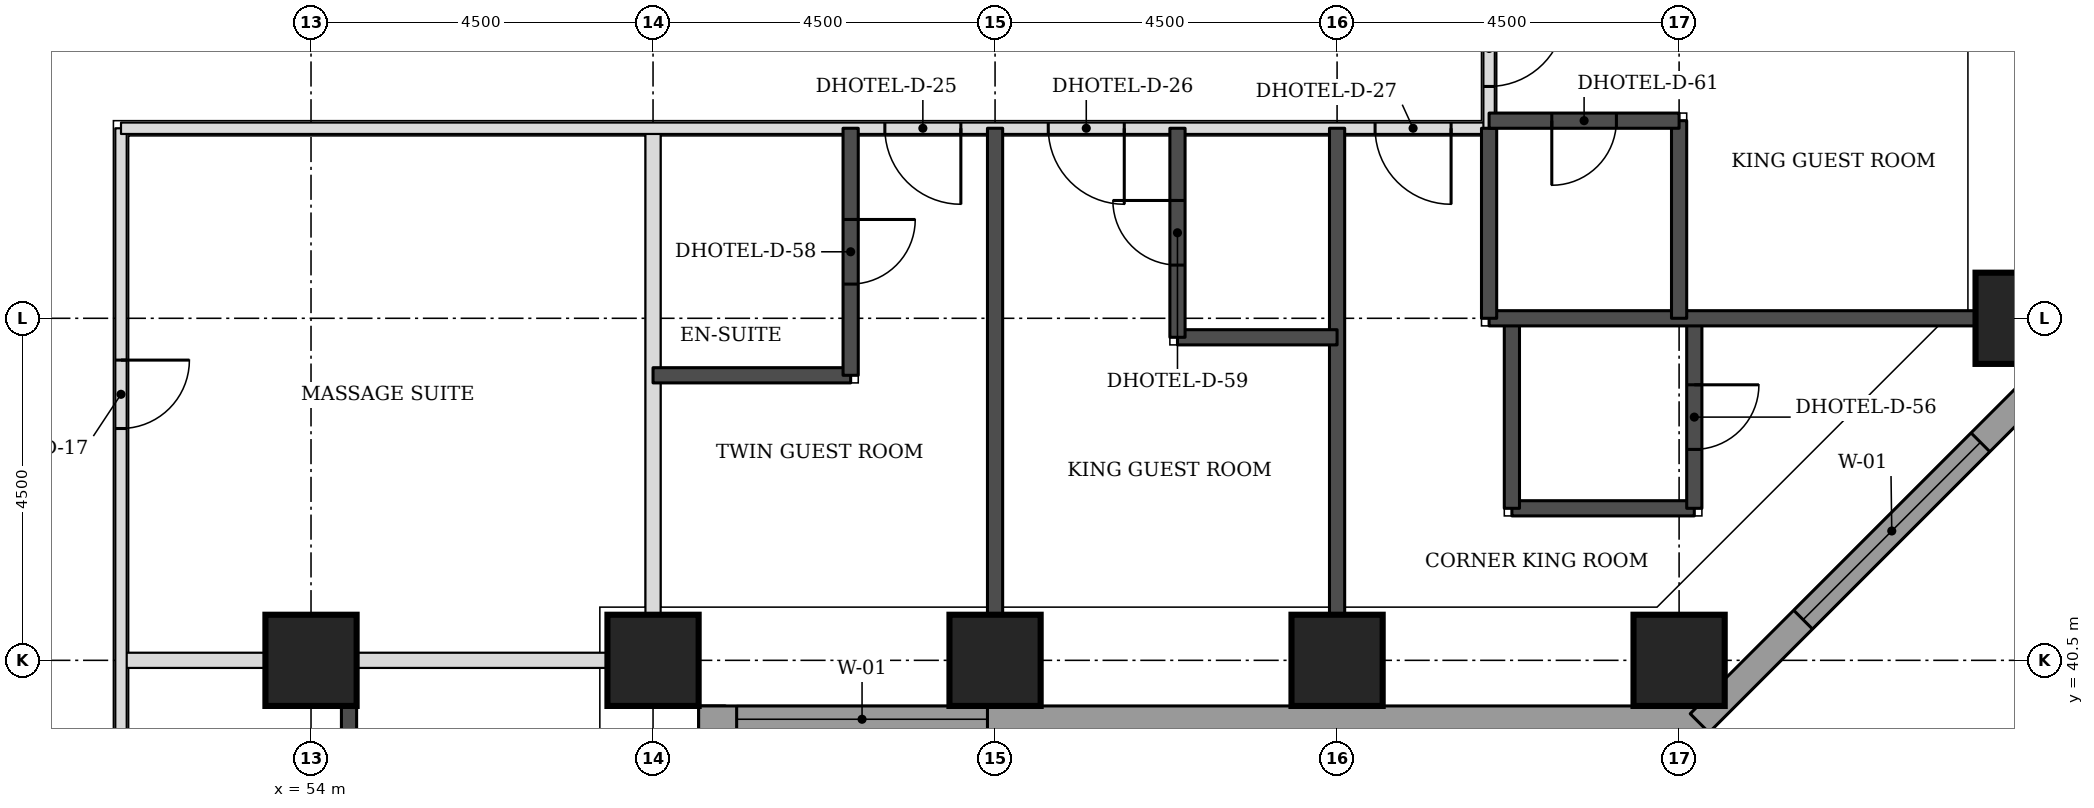
"""IFC4 building model, lengths in metres.
Left out: names, types, materials, properties, quantities, classifications, styles, units other than length and angle.
Written with IfcOpenShell. Run it as: python <this file> out.ifc"""

import sys

from ifc_helpers import new_model, si_unit, direction, frame, frame_2d, origin, origin_2d, place, context, subcontext, project, spatial, rectangle, extrude, element, fill, save


model = new_model("IFC4")
c1 = context("Model", 3, precision=1e-05, world=origin(), true_north=direction((0.0, 1.0)))
c2 = subcontext(c1, "Body", "Model", "MODEL_VIEW")
j1 = project(units=[si_unit("LENGTHUNIT", "METRE"), si_unit("PLANEANGLEUNIT", "RADIAN")], contexts=[c1])
p1 = place(None, origin())
s1 = spatial("IfcSite", under=j1, at=p1, CompositionType="ELEMENT")
p2 = place(p1, origin())
s2 = spatial("IfcBuilding", under=s1, at=p2, CompositionType="ELEMENT")
p3 = place(p2, frame((0.0, 0.0, 36.3)))
s3 = spatial("IfcBuildingStorey", under=s2, at=p3, CompositionType="ELEMENT", Elevation=36.3)
for number, where, z_axis, x_axis in (
    (1, (54.0, 40.5, 0.0), (0.0, 0.0, 1.0), (1.0, 0.0, 0.0)),
    (2, (58.5, 40.5, 0.0), (0.0, 0.0, 1.0), (1.0, 0.0, 0.0)),
    (3, (63.0, 40.5, 0.0), (0.0, 0.0, 1.0), (1.0, 0.0, 0.0)),
    (4, (67.5, 40.5, 0.0), (0.0, 0.0, 1.0), (1.0, 0.0, 0.0)),
    (5, (72.0, 40.5, 0.0), (0.0, 0.0, 1.0), (1.0, 0.0, 0.0)),
    (6, (76.5, 45.0, 0.0), (0.0, 0.0, 1.0), (1.0, 0.0, 0.0)),
):
    element("IfcColumn", number, at=place(p3, frame(where, z_axis=z_axis, x_axis=x_axis)), inside=s3, PredefinedType="COLUMN", context=c2, shape_type="SweptSolid", body=[
        extrude(rectangle(XDim=1.2, YDim=1.2, at=origin_2d()), origin(), (0.0, 0.0, 1.0), 3.3),
    ])
p4 = place(p3, frame((59.275, 22.106, 0.0), z_axis=(0.0, 0.0, 1.0), x_axis=(0.0, 1.0, 0.0)))
e7 = element("IfcWall", 7, at=p4, inside=s3, PredefinedType="STANDARD", context=c2, shape_type="SweptSolid", body=[
    extrude(rectangle(XDim=17.793, YDim=0.35, at=frame_2d((8.897, 0.0))), origin(), (0.0, 0.0, 1.0), 3.055),
])
p5 = place(p4, frame((5.493, 0.0, 0.8)))
e8 = element("IfcOpeningElement", 8, at=p5, cuts=e7, PredefinedType="OPENING", context=c2, shape_type="SweptSolid", body=[
    extrude(rectangle(XDim=3.3, YDim=1.5, at=frame_2d((1.65, 0.75))), frame((0.0, 0.185, 0.0), z_axis=(0.0, -1.0, 0.0), x_axis=(1.0, 0.0, 0.0)), (0.0, 0.0, 1.0), 0.37),
])
p6 = place(p4, frame((13.993, 0.0, 0.8)))
e9 = element("IfcOpeningElement", 9, at=p6, cuts=e7, PredefinedType="OPENING", context=c2, shape_type="SweptSolid", body=[
    extrude(rectangle(XDim=3.3, YDim=1.5, at=frame_2d((1.65, 0.75))), frame((0.0, 0.185, 0.0), z_axis=(0.0, -1.0, 0.0), x_axis=(1.0, 0.0, 0.0)), (0.0, 0.0, 1.0), 0.37),
])
p7 = place(p3, frame((59.1, 39.725, 0.0), z_axis=(0.0, 0.0, 1.0), x_axis=(1.0, 0.0, 0.0)))
e10 = element("IfcWall", 10, at=p7, inside=s3, PredefinedType="STANDARD", context=c2, shape_type="SweptSolid", body=[
    extrude(rectangle(XDim=13.293, YDim=0.35, at=frame_2d((6.647, 0.0))), origin(), (0.0, 0.0, 1.0), 3.055),
])
p8 = place(p7, frame((0.5, 0.0, 0.8)))
e11 = element("IfcOpeningElement", 11, at=p8, cuts=e10, PredefinedType="OPENING", context=c2, shape_type="SweptSolid", body=[
    extrude(rectangle(XDim=3.3, YDim=1.5, at=frame_2d((1.65, 0.75))), frame((0.0, 0.185, 0.0), z_axis=(0.0, -1.0, 0.0), x_axis=(1.0, 0.0, 0.0)), (0.0, 0.0, 1.0), 0.37),
])
p9 = place(p3, frame((72.27, 39.674, 0.0), z_axis=(0.0, 0.0, 1.0), x_axis=(0.707106781187, 0.707106781187, 0.0)))
e12 = element("IfcWall", 12, at=p9, inside=s3, PredefinedType="STANDARD", context=c2, shape_type="SweptSolid", body=[
    extrude(rectangle(XDim=7.151, YDim=0.35, at=frame_2d((3.576, 0.0))), origin(), (0.0, 0.0, 1.0), 3.055),
])
p10 = place(p9, frame((1.926, 0.0, 0.8)))
e13 = element("IfcOpeningElement", 13, at=p10, cuts=e12, PredefinedType="OPENING", context=c2, shape_type="SweptSolid", body=[
    extrude(rectangle(XDim=3.3, YDim=1.5, at=frame_2d((1.65, 0.75))), frame((0.0, 0.185, 0.0), z_axis=(0.0, -1.0, 0.0), x_axis=(1.0, 0.0, 0.0)), (0.0, 0.0, 1.0), 0.37),
])
p11 = place(p3, frame((51.5, 40.5, 0.0), z_axis=(0.0, 0.0, 1.0), x_axis=(1.0, 0.0, 0.0)))
e14 = element("IfcWall", 14, at=p11, inside=s3, PredefinedType="PARTITIONING", context=c2, shape_type="SweptSolid", body=[
    extrude(rectangle(XDim=6.4, YDim=0.2, at=frame_2d((3.2, 0.0))), origin(), (0.0, 0.0, 1.0), 2.33),
])
p12 = place(p3, frame((58.5, 41.1, 0.0), z_axis=(0.0, 0.0, 1.0), x_axis=(0.0, 1.0, 0.0)))
e15 = element("IfcWall", 15, at=p12, inside=s3, PredefinedType="PARTITIONING", context=c2, shape_type="SweptSolid", body=[
    extrude(rectangle(XDim=6.4, YDim=0.2, at=frame_2d((3.2, 0.0))), origin(), (0.0, 0.0, 1.0), 3.08),
])
p13 = place(p3, frame((51.5, 25.15, 0.0), z_axis=(0.0, 0.0, 1.0), x_axis=(0.0, 1.0, 0.0)))
e16 = element("IfcWall", 16, at=p13, inside=s3, PredefinedType="PARTITIONING", context=c2, shape_type="SweptSolid", body=[
    extrude(rectangle(XDim=22.35, YDim=0.15, at=frame_2d((11.175, 0.0))), origin(), (0.0, 0.0, 1.0), 3.08),
])
p14 = place(p13, frame((0.347, 0.0, 0.0)))
e17 = element("IfcOpeningElement", 17, at=p14, cuts=e16, PredefinedType="OPENING", context=c2, shape_type="SweptSolid", body=[
    extrude(rectangle(XDim=1.0, YDim=2.1, at=frame_2d((0.5, 1.05))), frame((0.0, 0.085, 0.0), z_axis=(0.0, -1.0, 0.0), x_axis=(1.0, 0.0, 0.0)), (0.0, 0.0, 1.0), 0.17),
])
p15 = place(p13, frame((2.3, 0.0, 0.0)))
e18 = element("IfcOpeningElement", 18, at=p15, cuts=e16, PredefinedType="OPENING", context=c2, shape_type="SweptSolid", body=[
    extrude(rectangle(XDim=1.0, YDim=2.1, at=frame_2d((0.5, 1.05))), frame((0.0, 0.085, 0.0), z_axis=(0.0, -1.0, 0.0), x_axis=(1.0, 0.0, 0.0)), (0.0, 0.0, 1.0), 0.17),
])
p16 = place(p13, frame((9.15, 0.0, 0.0)))
e19 = element("IfcOpeningElement", 19, at=p16, cuts=e16, PredefinedType="OPENING", context=c2, shape_type="SweptSolid", body=[
    extrude(rectangle(XDim=1.0, YDim=2.1, at=frame_2d((0.5, 1.05))), frame((0.0, 0.085, 0.0), z_axis=(0.0, -1.0, 0.0), x_axis=(1.0, 0.0, 0.0)), (0.0, 0.0, 1.0), 0.17),
])
p17 = place(p13, frame((11.3, 0.0, 0.0)))
e20 = element("IfcOpeningElement", 20, at=p17, cuts=e16, PredefinedType="OPENING", context=c2, shape_type="SweptSolid", body=[
    extrude(rectangle(XDim=1.0, YDim=2.1, at=frame_2d((0.5, 1.05))), frame((0.0, 0.085, 0.0), z_axis=(0.0, -1.0, 0.0), x_axis=(1.0, 0.0, 0.0)), (0.0, 0.0, 1.0), 0.17),
])
p18 = place(p13, frame((18.4, 0.0, 0.0)))
e21 = element("IfcOpeningElement", 21, at=p18, cuts=e16, PredefinedType="OPENING", context=c2, shape_type="SweptSolid", body=[
    extrude(rectangle(XDim=0.9, YDim=2.1, at=frame_2d((0.45, 1.05))), frame((0.0, 0.085, 0.0), z_axis=(0.0, -1.0, 0.0), x_axis=(1.0, 0.0, 0.0)), (0.0, 0.0, 1.0), 0.17),
])
p19 = place(p3, frame((51.5, 47.5, 0.0), z_axis=(0.0, 0.0, 1.0), x_axis=(1.0, 0.0, 0.0)))
e22 = element("IfcWall", 22, at=p19, inside=s3, PredefinedType="PARTITIONING", context=c2, shape_type="SweptSolid", body=[
    extrude(rectangle(XDim=18.0, YDim=0.15, at=frame_2d((9.0, 0.0))), origin(), (0.0, 0.0, 1.0), 3.08),
])
p20 = place(p19, frame((12.2, 0.0, 0.0)))
e23 = element("IfcOpeningElement", 23, at=p20, cuts=e22, PredefinedType="OPENING", context=c2, shape_type="SweptSolid", body=[
    extrude(rectangle(XDim=1.0, YDim=2.1, at=frame_2d((0.5, 1.05))), frame((0.0, 0.085, 0.0), z_axis=(0.0, -1.0, 0.0), x_axis=(1.0, 0.0, 0.0)), (0.0, 0.0, 1.0), 0.17),
])
p21 = place(p19, frame((10.05, 0.0, 0.0)))
e24 = element("IfcOpeningElement", 24, at=p21, cuts=e22, PredefinedType="OPENING", context=c2, shape_type="SweptSolid", body=[
    extrude(rectangle(XDim=1.0, YDim=2.1, at=frame_2d((0.5, 1.05))), frame((0.0, 0.085, 0.0), z_axis=(0.0, -1.0, 0.0), x_axis=(1.0, 0.0, 0.0)), (0.0, 0.0, 1.0), 0.17),
])
p22 = place(p19, frame((16.5, 0.0, 0.0)))
e25 = element("IfcOpeningElement", 25, at=p22, cuts=e22, PredefinedType="OPENING", context=c2, shape_type="SweptSolid", body=[
    extrude(rectangle(XDim=1.0, YDim=2.1, at=frame_2d((0.5, 1.05))), frame((0.0, 0.085, 0.0), z_axis=(0.0, -1.0, 0.0), x_axis=(1.0, 0.0, 0.0)), (0.0, 0.0, 1.0), 0.17),
])
p23 = place(p3, frame((69.5, 47.5, 0.0), z_axis=(0.0, 0.0, 1.0), x_axis=(0.0, 1.0, 0.0)))
e26 = element("IfcWall", 26, at=p23, inside=s3, PredefinedType="PARTITIONING", context=c2, shape_type="SweptSolid", body=[
    extrude(rectangle(XDim=26.5, YDim=0.15, at=frame_2d((13.25, 0.0))), origin(), (0.0, 0.0, 1.0), 3.08),
])
p24 = place(p23, frame((22.65, 0.0, 0.0)))
e27 = element("IfcOpeningElement", 27, at=p24, cuts=e26, PredefinedType="OPENING", context=c2, shape_type="SweptSolid", body=[
    extrude(rectangle(XDim=1.0, YDim=2.1, at=frame_2d((0.5, 1.05))), frame((0.0, 0.085, 0.0), z_axis=(0.0, -1.0, 0.0), x_axis=(1.0, 0.0, 0.0)), (0.0, 0.0, 1.0), 0.17),
])
p25 = place(p23, frame((16.6, 0.0, 0.0)))
e28 = element("IfcOpeningElement", 28, at=p25, cuts=e26, PredefinedType="OPENING", context=c2, shape_type="SweptSolid", body=[
    extrude(rectangle(XDim=1.0, YDim=2.1, at=frame_2d((0.5, 1.05))), frame((0.0, 0.085, 0.0), z_axis=(0.0, -1.0, 0.0), x_axis=(1.0, 0.0, 0.0)), (0.0, 0.0, 1.0), 0.17),
])
p26 = place(p23, frame((4.25, 0.0, 0.0)))
e29 = element("IfcOpeningElement", 29, at=p26, cuts=e26, PredefinedType="OPENING", context=c2, shape_type="SweptSolid", body=[
    extrude(rectangle(XDim=1.1, YDim=2.1, at=frame_2d((0.55, 1.05))), frame((0.0, 0.085, 0.0), z_axis=(0.0, -1.0, 0.0), x_axis=(1.0, 0.0, 0.0)), (0.0, 0.0, 1.0), 0.17),
])
p27 = place(p23, frame((0.55, 0.0, 0.0)))
e30 = element("IfcOpeningElement", 30, at=p27, cuts=e26, PredefinedType="OPENING", context=c2, shape_type="SweptSolid", body=[
    extrude(rectangle(XDim=1.0, YDim=2.1, at=frame_2d((0.5, 1.05))), frame((0.0, 0.085, 0.0), z_axis=(0.0, -1.0, 0.0), x_axis=(1.0, 0.0, 0.0)), (0.0, 0.0, 1.0), 0.17),
])
p28 = place(p3, frame((54.5, 37.9, 0.0), z_axis=(0.0, 0.0, 1.0), x_axis=(0.0, 1.0, 0.0)))
e31 = element("IfcWall", 31, at=p28, inside=s3, PredefinedType="SOLIDWALL", context=c2, shape_type="SweptSolid", body=[
    extrude(rectangle(XDim=2.6, YDim=0.2, at=frame_2d((1.3, 0.0))), origin(), (0.0, 0.0, 1.0), 3.08),
])
for number, where, z_axis, x_axis in (
    (32, (63.0, 41.1, 0.0), (0.0, 0.0, 1.0), (0.0, 1.0, 0.0)),
    (33, (67.5, 41.1, 0.0), (0.0, 0.0, 1.0), (0.0, 1.0, 0.0)),
):
    element("IfcWall", number, at=place(p3, frame(where, z_axis=z_axis, x_axis=x_axis)), inside=s3, PredefinedType="SOLIDWALL", context=c2, shape_type="SweptSolid", body=[
        extrude(rectangle(XDim=6.4, YDim=0.2, at=frame_2d((3.2, 0.0))), origin(), (0.0, 0.0, 1.0), 3.08),
    ])
p29 = place(p3, frame((69.8, 42.5, 0.0), z_axis=(0.0, 0.0, 1.0), x_axis=(1.0, 0.0, 0.0)))
e34 = element("IfcWall", 34, at=p29, inside=s3, PredefinedType="SOLIDWALL", context=c2, shape_type="SweptSolid", body=[
    extrude(rectangle(XDim=2.4, YDim=0.2, at=frame_2d((1.2, 0.0))), origin(), (0.0, 0.0, 1.0), 3.08),
])
p30 = place(p3, frame((69.8, 42.5, 0.0), z_axis=(0.0, 0.0, 1.0), x_axis=(0.0, 1.0, 0.0)))
e35 = element("IfcWall", 35, at=p30, inside=s3, PredefinedType="SOLIDWALL", context=c2, shape_type="SweptSolid", body=[
    extrude(rectangle(XDim=2.5, YDim=0.2, at=frame_2d((1.25, 0.0))), origin(), (0.0, 0.0, 1.0), 3.08),
])
p31 = place(p3, frame((72.2, 42.5, 0.0), z_axis=(0.0, 0.0, 1.0), x_axis=(0.0, 1.0, 0.0)))
e36 = element("IfcWall", 36, at=p31, inside=s3, PredefinedType="SOLIDWALL", context=c2, shape_type="SweptSolid", body=[
    extrude(rectangle(XDim=2.5, YDim=0.2, at=frame_2d((1.25, 0.0))), origin(), (0.0, 0.0, 1.0), 3.08),
])
p32 = place(p31, frame((0.775, 0.0, 0.0)))
e37 = element("IfcOpeningElement", 37, at=p32, cuts=e36, PredefinedType="OPENING", context=c2, shape_type="SweptSolid", body=[
    extrude(rectangle(XDim=0.85, YDim=2.1, at=frame_2d((0.425, 1.05))), frame((0.0, 0.11, 0.0), z_axis=(0.0, -1.0, 0.0), x_axis=(1.0, 0.0, 0.0)), (0.0, 0.0, 1.0), 0.22),
])
p33 = place(p3, frame((58.5, 44.25, 0.0), z_axis=(0.0, 0.0, 1.0), x_axis=(1.0, 0.0, 0.0)))
e38 = element("IfcWall", 38, at=p33, inside=s3, PredefinedType="SOLIDWALL", context=c2, shape_type="SweptSolid", body=[
    extrude(rectangle(XDim=2.6, YDim=0.2, at=frame_2d((1.3, 0.0))), origin(), (0.0, 0.0, 1.0), 3.08),
])
p34 = place(p3, frame((61.1, 44.25, 0.0), z_axis=(0.0, 0.0, 1.0), x_axis=(0.0, 1.0, 0.0)))
e39 = element("IfcWall", 39, at=p34, inside=s3, PredefinedType="SOLIDWALL", context=c2, shape_type="SweptSolid", body=[
    extrude(rectangle(XDim=3.25, YDim=0.2, at=frame_2d((1.625, 0.0))), origin(), (0.0, 0.0, 1.0), 3.08),
])
p35 = place(p34, frame((1.2, 0.0, 0.0)))
e40 = element("IfcOpeningElement", 40, at=p35, cuts=e39, PredefinedType="OPENING", context=c2, shape_type="SweptSolid", body=[
    extrude(rectangle(XDim=0.85, YDim=2.1, at=frame_2d((0.425, 1.05))), frame((0.0, 0.11, 0.0), z_axis=(0.0, -1.0, 0.0), x_axis=(1.0, 0.0, 0.0)), (0.0, 0.0, 1.0), 0.22),
])
p36 = place(p3, frame((65.4, 44.75, 0.0), z_axis=(0.0, 0.0, 1.0), x_axis=(1.0, 0.0, 0.0)))
e41 = element("IfcWall", 41, at=p36, inside=s3, PredefinedType="SOLIDWALL", context=c2, shape_type="SweptSolid", body=[
    extrude(rectangle(XDim=2.1, YDim=0.2, at=frame_2d((1.05, 0.0))), origin(), (0.0, 0.0, 1.0), 3.08),
])
p37 = place(p3, frame((65.4, 44.75, 0.0), z_axis=(0.0, 0.0, 1.0), x_axis=(0.0, 1.0, 0.0)))
e42 = element("IfcWall", 42, at=p37, inside=s3, PredefinedType="SOLIDWALL", context=c2, shape_type="SweptSolid", body=[
    extrude(rectangle(XDim=2.75, YDim=0.2, at=frame_2d((1.375, 0.0))), origin(), (0.0, 0.0, 1.0), 3.08),
])
p38 = place(p37, frame((0.95, 0.0, 0.0)))
e43 = element("IfcOpeningElement", 43, at=p38, cuts=e42, PredefinedType="OPENING", context=c2, shape_type="SweptSolid", body=[
    extrude(rectangle(XDim=0.85, YDim=2.1, at=frame_2d((0.425, 1.05))), frame((0.0, 0.11, 0.0), z_axis=(0.0, -1.0, 0.0), x_axis=(1.0, 0.0, 0.0)), (0.0, 0.0, 1.0), 0.22),
])
p39 = place(p3, frame((69.5, 45.0, 0.0), z_axis=(0.0, 0.0, 1.0), x_axis=(1.0, 0.0, 0.0)))
e44 = element("IfcWall", 44, at=p39, inside=s3, PredefinedType="SOLIDWALL", context=c2, shape_type="SweptSolid", body=[
    extrude(rectangle(XDim=6.4, YDim=0.2, at=frame_2d((3.2, 0.0))), origin(), (0.0, 0.0, 1.0), 3.08),
])
p40 = place(p3, frame((69.5, 45.0, 0.0), z_axis=(0.0, 0.0, 1.0), x_axis=(0.0, 1.0, 0.0)))
e45 = element("IfcWall", 45, at=p40, inside=s3, PredefinedType="SOLIDWALL", context=c2, shape_type="SweptSolid", body=[
    extrude(rectangle(XDim=2.5, YDim=0.2, at=frame_2d((1.25, 0.0))), origin(), (0.0, 0.0, 1.0), 3.08),
])
p41 = place(p3, frame((72.0, 45.0, 0.0), z_axis=(0.0, 0.0, 1.0), x_axis=(0.0, 1.0, 0.0)))
e46 = element("IfcWall", 46, at=p41, inside=s3, PredefinedType="SOLIDWALL", context=c2, shape_type="SweptSolid", body=[
    extrude(rectangle(XDim=2.6, YDim=0.2, at=frame_2d((1.3, 0.0))), origin(), (0.0, 0.0, 1.0), 3.08),
])
p42 = place(p3, frame((69.5, 47.6, 0.0), z_axis=(0.0, 0.0, 1.0), x_axis=(1.0, 0.0, 0.0)))
e47 = element("IfcWall", 47, at=p42, inside=s3, PredefinedType="SOLIDWALL", context=c2, shape_type="SweptSolid", body=[
    extrude(rectangle(XDim=2.5, YDim=0.2, at=frame_2d((1.25, 0.0))), origin(), (0.0, 0.0, 1.0), 3.08),
])
p43 = place(p42, frame((0.825, 0.0, 0.0)))
e48 = element("IfcOpeningElement", 48, at=p43, cuts=e47, PredefinedType="OPENING", context=c2, shape_type="SweptSolid", body=[
    extrude(rectangle(XDim=0.85, YDim=2.1, at=frame_2d((0.425, 1.05))), frame((0.0, 0.11, 0.0), z_axis=(0.0, -1.0, 0.0), x_axis=(1.0, 0.0, 0.0)), (0.0, 0.0, 1.0), 0.22),
])
p44 = place(p8, origin())
e49 = element("IfcWindow", 49, at=p44, inside=s3, PartitioningType="SINGLE_PANEL", PredefinedType="WINDOW", context=c2, shape_type="SweptSolid", body=[
    extrude(rectangle(XDim=3.3, YDim=1.5, at=frame_2d((1.65, 0.75))), frame((0.0, 0.085, 0.0), z_axis=(0.0, -1.0, 0.0), x_axis=(1.0, 0.0, 0.0)), (0.0, 0.0, 1.0), 0.06),
])
fill(e11, e49)
p45 = place(p10, origin())
e50 = element("IfcWindow", 50, at=p45, inside=s3, PartitioningType="SINGLE_PANEL", PredefinedType="WINDOW", context=c2, shape_type="SweptSolid", body=[
    extrude(rectangle(XDim=3.3, YDim=1.5, at=frame_2d((1.65, 0.75))), frame((0.0, 0.085, 0.0), z_axis=(0.0, -1.0, 0.0), x_axis=(1.0, 0.0, 0.0)), (0.0, 0.0, 1.0), 0.06),
])
fill(e13, e50)
p46 = place(p27, frame((1.0, 0.0, 0.0), z_axis=(0.0, 0.0, 1.0), x_axis=(-1.0, 0.0, 0.0)))
e51 = element("IfcDoor", 51, at=p46, inside=s3, OperationType="SINGLE_SWING_LEFT", PredefinedType="DOOR", context=c2, shape_type="SweptSolid", body=[
    extrude(rectangle(XDim=1.0, YDim=2.1, at=frame_2d((0.5, 1.05))), frame((0.0, 0.025, 0.0), z_axis=(0.0, -1.0, 0.0), x_axis=(1.0, 0.0, 0.0)), (0.0, 0.0, 1.0), 0.05),
])
fill(e30, e51)
p47 = place(p43, frame((0.85, 0.0, 0.0), z_axis=(0.0, 0.0, 1.0), x_axis=(-1.0, 0.0, 0.0)))
e52 = element("IfcDoor", 52, at=p47, inside=s3, OperationType="SINGLE_SWING_RIGHT", PredefinedType="DOOR", context=c2, shape_type="SweptSolid", body=[
    extrude(rectangle(XDim=0.85, YDim=2.1, at=frame_2d((0.425, 1.05))), frame((0.0, 0.025, 0.0), z_axis=(0.0, -1.0, 0.0), x_axis=(1.0, 0.0, 0.0)), (0.0, 0.0, 1.0), 0.05),
])
fill(e48, e52)
p48 = place(p20, frame((1.0, 0.0, 0.0), z_axis=(0.0, 0.0, 1.0), x_axis=(-1.0, 0.0, 0.0)))
e53 = element("IfcDoor", 53, at=p48, inside=s3, OperationType="SINGLE_SWING_LEFT", PredefinedType="DOOR", context=c2, shape_type="SweptSolid", body=[
    extrude(rectangle(XDim=1.0, YDim=2.1, at=frame_2d((0.5, 1.05))), frame((0.0, 0.025, 0.0), z_axis=(0.0, -1.0, 0.0), x_axis=(1.0, 0.0, 0.0)), (0.0, 0.0, 1.0), 0.05),
])
fill(e23, e53)
p49 = place(p38, origin())
e54 = element("IfcDoor", 54, at=p49, inside=s3, OperationType="SINGLE_SWING_RIGHT", PredefinedType="DOOR", context=c2, shape_type="SweptSolid", body=[
    extrude(rectangle(XDim=0.85, YDim=2.1, at=frame_2d((0.425, 1.05))), frame((0.0, 0.025, 0.0), z_axis=(0.0, -1.0, 0.0), x_axis=(1.0, 0.0, 0.0)), (0.0, 0.0, 1.0), 0.05),
])
fill(e43, e54)
p50 = place(p21, frame((1.0, 0.0, 0.0), z_axis=(0.0, 0.0, 1.0), x_axis=(-1.0, 0.0, 0.0)))
e55 = element("IfcDoor", 55, at=p50, inside=s3, OperationType="SINGLE_SWING_LEFT", PredefinedType="DOOR", context=c2, shape_type="SweptSolid", body=[
    extrude(rectangle(XDim=1.0, YDim=2.1, at=frame_2d((0.5, 1.05))), frame((0.0, 0.025, 0.0), z_axis=(0.0, -1.0, 0.0), x_axis=(1.0, 0.0, 0.0)), (0.0, 0.0, 1.0), 0.05),
])
fill(e24, e55)
p51 = place(p35, frame((0.85, 0.0, 0.0), z_axis=(0.0, 0.0, 1.0), x_axis=(-1.0, 0.0, 0.0)))
e56 = element("IfcDoor", 56, at=p51, inside=s3, OperationType="SINGLE_SWING_LEFT", PredefinedType="DOOR", context=c2, shape_type="SweptSolid", body=[
    extrude(rectangle(XDim=0.85, YDim=2.1, at=frame_2d((0.425, 1.05))), frame((0.0, 0.025, 0.0), z_axis=(0.0, -1.0, 0.0), x_axis=(1.0, 0.0, 0.0)), (0.0, 0.0, 1.0), 0.05),
])
fill(e40, e56)
p52 = place(p22, frame((1.0, 0.0, 0.0), z_axis=(0.0, 0.0, 1.0), x_axis=(-1.0, 0.0, 0.0)))
e57 = element("IfcDoor", 57, at=p52, inside=s3, OperationType="SINGLE_SWING_LEFT", PredefinedType="DOOR", context=c2, shape_type="SweptSolid", body=[
    extrude(rectangle(XDim=1.0, YDim=2.1, at=frame_2d((0.5, 1.05))), frame((0.0, 0.025, 0.0), z_axis=(0.0, -1.0, 0.0), x_axis=(1.0, 0.0, 0.0)), (0.0, 0.0, 1.0), 0.05),
])
fill(e25, e57)
p53 = place(p32, frame((0.85, 0.0, 0.0), z_axis=(0.0, 0.0, 1.0), x_axis=(-1.0, 0.0, 0.0)))
e58 = element("IfcDoor", 58, at=p53, inside=s3, OperationType="SINGLE_SWING_LEFT", PredefinedType="DOOR", context=c2, shape_type="SweptSolid", body=[
    extrude(rectangle(XDim=0.85, YDim=2.1, at=frame_2d((0.425, 1.05))), frame((0.0, 0.025, 0.0), z_axis=(0.0, -1.0, 0.0), x_axis=(1.0, 0.0, 0.0)), (0.0, 0.0, 1.0), 0.05),
])
fill(e37, e58)
p54 = place(p18, frame((0.9, 0.0, 0.0), z_axis=(0.0, 0.0, 1.0), x_axis=(-1.0, 0.0, 0.0)))
e59 = element("IfcDoor", 59, at=p54, inside=s3, OperationType="SINGLE_SWING_LEFT", PredefinedType="DOOR", context=c2, shape_type="SweptSolid", body=[
    extrude(rectangle(XDim=0.9, YDim=2.1, at=frame_2d((0.45, 1.05))), frame((0.0, 0.025, 0.0), z_axis=(0.0, -1.0, 0.0), x_axis=(1.0, 0.0, 0.0)), (0.0, 0.0, 1.0), 0.05),
])
fill(e21, e59)
save(model, sys.argv[1])
